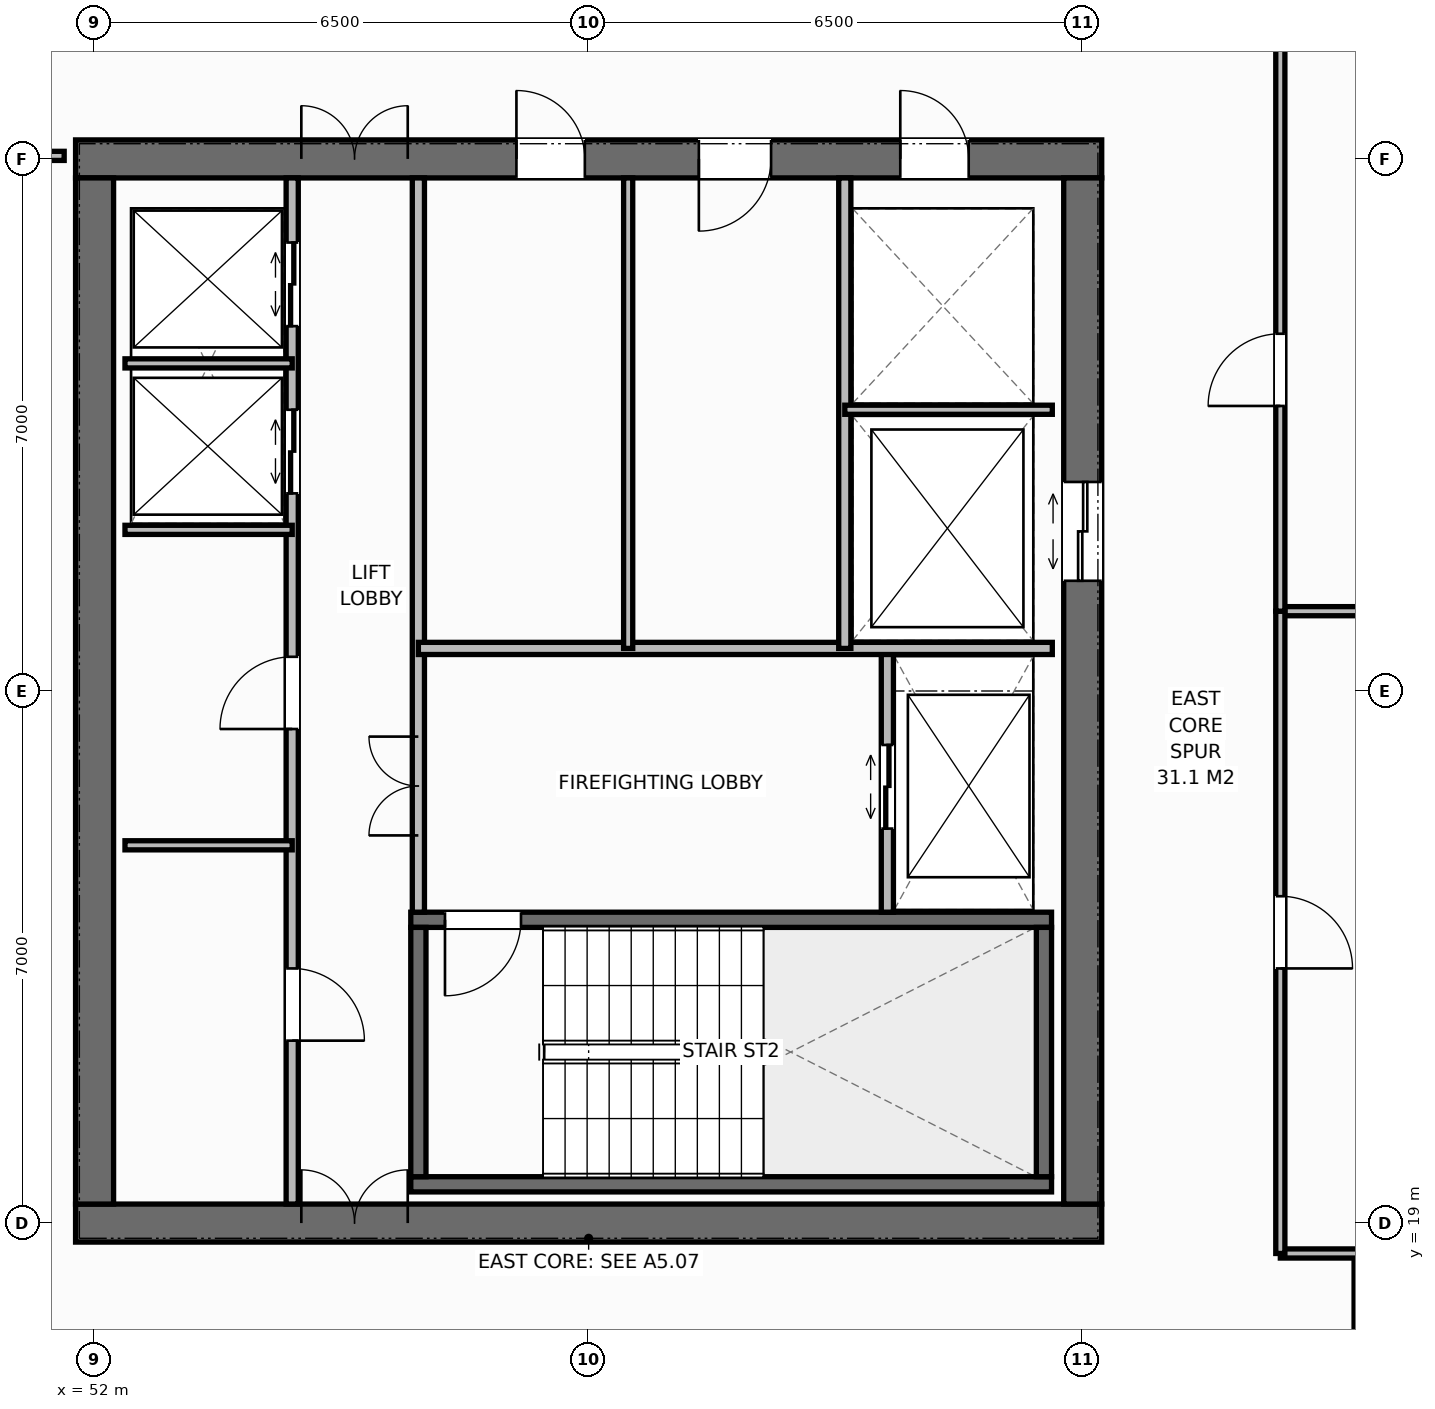
"""IFC4 building model, lengths in metres.
Left out: names, types, materials, properties, quantities, classifications, styles, units other than length and angle.
Written with IfcOpenShell. Run it as: python <this file> out.ifc"""

import sys

from ifc_helpers import new_model, si_unit, direction, frame, frame_2d, origin, place, context, subcontext, project, spatial, rectangle, extrude, element, fill, save


model = new_model("IFC4")
c1 = context("Model", 3, precision=1e-05, world=origin(), true_north=direction((0.0, 1.0)))
c2 = subcontext(c1, "Body", "Model", "MODEL_VIEW")
j1 = project(units=[si_unit("LENGTHUNIT", "METRE"), si_unit("PLANEANGLEUNIT", "RADIAN")], contexts=[c1])
p1 = place(None, origin())
s1 = spatial("IfcSite", under=j1, at=p1, CompositionType="ELEMENT")
p2 = place(p1, origin())
s2 = spatial("IfcBuilding", under=s1, at=p2, CompositionType="ELEMENT")
p3 = place(p2, frame((0.0, 0.0, 240.4)))
s3 = spatial("IfcBuildingStorey", under=s2, at=p3, CompositionType="ELEMENT", Elevation=240.4)
p4 = place(p3, frame((51.75, 19.0, 0.0), z_axis=(0.0, 0.0, 1.0), x_axis=(1.0, 0.0, 0.0)))
e1 = element("IfcWall", 1, at=p4, inside=s3, PredefinedType="SHEAR", context=c2, shape_type="SweptSolid", body=[
    extrude(rectangle(XDim=13.5, YDim=0.5, at=frame_2d((6.75, 0.0))), origin(), (0.0, 0.0, 1.0), 3.8),
])
p5 = place(p4, frame((2.97, 0.0, 0.0)))
e2 = element("IfcOpeningElement", 2, at=p5, cuts=e1, PredefinedType="OPENING", context=c2, shape_type="SweptSolid", body=[
    extrude(rectangle(XDim=1.4, YDim=2.2, at=frame_2d((0.7, 1.1))), frame((0.0, 0.26, 0.0), z_axis=(0.0, -1.0, 0.0), x_axis=(1.0, 0.0, 0.0)), (0.0, 0.0, 1.0), 0.52),
])
p6 = place(p3, frame((51.75, 33.0, 0.0), z_axis=(0.0, 0.0, 1.0), x_axis=(1.0, 0.0, 0.0)))
e3 = element("IfcWall", 3, at=p6, inside=s3, PredefinedType="SHEAR", context=c2, shape_type="SweptSolid", body=[
    extrude(rectangle(XDim=13.5, YDim=0.5, at=frame_2d((6.75, 0.0))), origin(), (0.0, 0.0, 1.0), 3.8),
])
p7 = place(p6, frame((2.97, 0.0, 0.0)))
e4 = element("IfcOpeningElement", 4, at=p7, cuts=e3, PredefinedType="OPENING", context=c2, shape_type="SweptSolid", body=[
    extrude(rectangle(XDim=1.4, YDim=2.2, at=frame_2d((0.7, 1.1))), frame((0.0, 0.26, 0.0), z_axis=(0.0, -1.0, 0.0), x_axis=(1.0, 0.0, 0.0)), (0.0, 0.0, 1.0), 0.52),
])
p8 = place(p6, frame((10.85, 0.0, 0.0)))
e5 = element("IfcOpeningElement", 5, at=p8, cuts=e3, PredefinedType="OPENING", context=c2, shape_type="SweptSolid", body=[
    extrude(rectangle(XDim=0.9, YDim=2.15, at=frame_2d((0.45, 1.075))), frame((0.0, 0.26, 0.0), z_axis=(0.0, -1.0, 0.0), x_axis=(1.0, 0.0, 0.0)), (0.0, 0.0, 1.0), 0.52),
])
p9 = place(p6, frame((5.8, 0.0, 0.0)))
e6 = element("IfcOpeningElement", 6, at=p9, cuts=e3, PredefinedType="OPENING", context=c2, shape_type="SweptSolid", body=[
    extrude(rectangle(XDim=0.9, YDim=2.15, at=frame_2d((0.45, 1.075))), frame((0.0, 0.26, 0.0), z_axis=(0.0, -1.0, 0.0), x_axis=(1.0, 0.0, 0.0)), (0.0, 0.0, 1.0), 0.52),
])
p10 = place(p6, frame((8.2, 0.0, 0.0)))
e7 = element("IfcOpeningElement", 7, at=p10, cuts=e3, PredefinedType="OPENING", context=c2, shape_type="SweptSolid", body=[
    extrude(rectangle(XDim=0.95, YDim=2.15, at=frame_2d((0.475, 1.075))), frame((0.0, 0.26, 0.0), z_axis=(0.0, -1.0, 0.0), x_axis=(1.0, 0.0, 0.0)), (0.0, 0.0, 1.0), 0.52),
])
p11 = place(p3, frame((52.0, 19.25, 0.0), z_axis=(0.0, 0.0, 1.0), x_axis=(0.0, 1.0, 0.0)))
e8 = element("IfcWall", 8, at=p11, inside=s3, PredefinedType="SHEAR", context=c2, shape_type="SweptSolid", body=[
    extrude(rectangle(XDim=13.5, YDim=0.5, at=frame_2d((6.75, 0.0))), origin(), (0.0, 0.0, 1.0), 3.8),
])
p12 = place(p3, frame((65.0, 19.25, 0.0), z_axis=(0.0, 0.0, 1.0), x_axis=(0.0, 1.0, 0.0)))
e9 = element("IfcWall", 9, at=p12, inside=s3, PredefinedType="SHEAR", context=c2, shape_type="SweptSolid", body=[
    extrude(rectangle(XDim=13.5, YDim=0.5, at=frame_2d((6.75, 0.0))), origin(), (0.0, 0.0, 1.0), 3.8),
])
p13 = place(p12, frame((8.2, 0.0, 0.0)))
e10 = element("IfcOpeningElement", 10, at=p13, cuts=e9, PredefinedType="OPENING", context=c2, shape_type="SweptSolid", body=[
    extrude(rectangle(XDim=1.3, YDim=2.2, at=frame_2d((0.65, 1.1))), frame((0.0, 0.26, 0.0), z_axis=(0.0, -1.0, 0.0), x_axis=(1.0, 0.0, 0.0)), (0.0, 0.0, 1.0), 0.52),
])
p14 = place(p3, frame((56.16, 19.51, 0.0), z_axis=(0.0, 0.0, 1.0), x_axis=(1.0, 0.0, 0.0)))
e11 = element("IfcWall", 11, at=p14, inside=s3, PredefinedType="SHEAR", context=c2, shape_type="SweptSolid", body=[
    extrude(rectangle(XDim=8.43, YDim=0.2, at=frame_2d((4.215, 0.0))), origin(), (0.0, 0.0, 1.0), 3.8),
])
p15 = place(p3, frame((56.16, 22.99, 0.0), z_axis=(0.0, 0.0, 1.0), x_axis=(1.0, 0.0, 0.0)))
e12 = element("IfcWall", 12, at=p15, inside=s3, PredefinedType="SHEAR", context=c2, shape_type="SweptSolid", body=[
    extrude(rectangle(XDim=8.43, YDim=0.2, at=frame_2d((4.215, 0.0))), origin(), (0.0, 0.0, 1.0), 3.8),
])
p16 = place(p15, frame((0.45, 0.0, 0.0)))
e13 = element("IfcOpeningElement", 13, at=p16, cuts=e12, PredefinedType="OPENING", context=c2, shape_type="SweptSolid", body=[
    extrude(rectangle(XDim=1.0, YDim=2.15, at=frame_2d((0.5, 1.075))), frame((0.0, 0.11, 0.0), z_axis=(0.0, -1.0, 0.0), x_axis=(1.0, 0.0, 0.0)), (0.0, 0.0, 1.0), 0.22),
])
for number, where, z_axis, x_axis in (
    (14, (56.26, 19.61, 0.0), (0.0, 0.0, 1.0), (0.0, 1.0, 0.0)),
    (15, (64.49, 19.61, 0.0), (0.0, 0.0, 1.0), (0.0, 1.0, 0.0)),
):
    element("IfcWall", number, at=place(p3, frame(where, z_axis=z_axis, x_axis=x_axis)), inside=s3, PredefinedType="SHEAR", context=c2, shape_type="SweptSolid", body=[
        extrude(rectangle(XDim=3.28, YDim=0.2, at=frame_2d((1.64, 0.0))), origin(), (0.0, 0.0, 1.0), 3.8),
    ])
p17 = place(p3, frame((54.6, 19.25, 0.0), z_axis=(0.0, 0.0, 1.0), x_axis=(0.0, 1.0, 0.0)))
e16 = element("IfcWall", 16, at=p17, inside=s3, PredefinedType="STANDARD", context=c2, shape_type="SweptSolid", body=[
    extrude(rectangle(XDim=13.5, YDim=0.16, at=frame_2d((6.75, 0.0))), origin(), (0.0, 0.0, 1.0), 3.58),
])
p18 = place(p17, frame((2.15, 0.0, 0.0)))
e17 = element("IfcOpeningElement", 17, at=p18, cuts=e16, PredefinedType="OPENING", context=c2, shape_type="SweptSolid", body=[
    extrude(rectangle(XDim=0.95, YDim=2.15, at=frame_2d((0.475, 1.075))), frame((0.0, 0.09, 0.0), z_axis=(0.0, -1.0, 0.0), x_axis=(1.0, 0.0, 0.0)), (0.0, 0.0, 1.0), 0.18),
])
p19 = place(p17, frame((6.25, 0.0, 0.0)))
e18 = element("IfcOpeningElement", 18, at=p19, cuts=e16, PredefinedType="OPENING", context=c2, shape_type="SweptSolid", body=[
    extrude(rectangle(XDim=0.95, YDim=2.15, at=frame_2d((0.475, 1.075))), frame((0.0, 0.09, 0.0), z_axis=(0.0, -1.0, 0.0), x_axis=(1.0, 0.0, 0.0)), (0.0, 0.0, 1.0), 0.18),
])
p20 = place(p17, frame((9.35, 0.0, 0.0)))
e19 = element("IfcOpeningElement", 19, at=p20, cuts=e16, PredefinedType="OPENING", context=c2, shape_type="SweptSolid", body=[
    extrude(rectangle(XDim=1.1, YDim=2.2, at=frame_2d((0.55, 1.1))), frame((0.0, 0.09, 0.0), z_axis=(0.0, -1.0, 0.0), x_axis=(1.0, 0.0, 0.0)), (0.0, 0.0, 1.0), 0.18),
])
p21 = place(p17, frame((11.55, 0.0, 0.0)))
e20 = element("IfcOpeningElement", 20, at=p21, cuts=e16, PredefinedType="OPENING", context=c2, shape_type="SweptSolid", body=[
    extrude(rectangle(XDim=1.1, YDim=2.2, at=frame_2d((0.55, 1.1))), frame((0.0, 0.09, 0.0), z_axis=(0.0, -1.0, 0.0), x_axis=(1.0, 0.0, 0.0)), (0.0, 0.0, 1.0), 0.18),
])
p22 = place(p3, frame((56.26, 23.09, 0.0), z_axis=(0.0, 0.0, 1.0), x_axis=(0.0, 1.0, 0.0)))
e21 = element("IfcWall", 21, at=p22, inside=s3, PredefinedType="STANDARD", context=c2, shape_type="SweptSolid", body=[
    extrude(rectangle(XDim=9.66, YDim=0.16, at=frame_2d((4.83, 0.0))), origin(), (0.0, 0.0, 1.0), 3.58),
])
p23 = place(p22, frame((1.01, 0.0, 0.0)))
e22 = element("IfcOpeningElement", 22, at=p23, cuts=e21, PredefinedType="OPENING", context=c2, shape_type="SweptSolid", body=[
    extrude(rectangle(XDim=1.3, YDim=2.2, at=frame_2d((0.65, 1.1))), frame((0.0, 0.09, 0.0), z_axis=(0.0, -1.0, 0.0), x_axis=(1.0, 0.0, 0.0)), (0.0, 0.0, 1.0), 0.18),
])
for number, where, z_axis, x_axis in (
    (23, (52.4, 23.97, 0.0), (0.0, 0.0, 1.0), (1.0, 0.0, 0.0)),
    (24, (52.4, 28.12, 0.0), (0.0, 0.0, 1.0), (1.0, 0.0, 0.0)),
    (25, (52.4, 30.31, 0.0), (0.0, 0.0, 1.0), (1.0, 0.0, 0.0)),
):
    element("IfcWall", number, at=place(p3, frame(where, z_axis=z_axis, x_axis=x_axis)), inside=s3, PredefinedType="PARTITIONING", context=c2, shape_type="SweptSolid", body=[
        extrude(rectangle(XDim=2.2, YDim=0.12, at=frame_2d((1.1, 0.0))), origin(), (0.0, 0.0, 1.0), 3.58),
    ])
p24 = place(p3, frame((62.43, 23.09, 0.0), z_axis=(0.0, 0.0, 1.0), x_axis=(0.0, 1.0, 0.0)))
e26 = element("IfcWall", 26, at=p24, inside=s3, PredefinedType="STANDARD", context=c2, shape_type="SweptSolid", body=[
    extrude(rectangle(XDim=3.47, YDim=0.16, at=frame_2d((1.735, 0.0))), origin(), (0.0, 0.0, 1.0), 3.58),
])
p25 = place(p24, frame((1.1, 0.0, 0.0)))
e27 = element("IfcOpeningElement", 27, at=p25, cuts=e26, PredefinedType="OPENING", context=c2, shape_type="SweptSolid", body=[
    extrude(rectangle(XDim=1.1, YDim=2.2, at=frame_2d((0.55, 1.1))), frame((0.0, 0.09, 0.0), z_axis=(0.0, -1.0, 0.0), x_axis=(1.0, 0.0, 0.0)), (0.0, 0.0, 1.0), 0.18),
])
p26 = place(p3, frame((56.26, 26.56, 0.0), z_axis=(0.0, 0.0, 1.0), x_axis=(1.0, 0.0, 0.0)))
e28 = element("IfcWall", 28, at=p26, inside=s3, PredefinedType="STANDARD", context=c2, shape_type="SweptSolid", body=[
    extrude(rectangle(XDim=8.34, YDim=0.16, at=frame_2d((4.17, 0.0))), origin(), (0.0, 0.0, 1.0), 3.58),
])
p27 = place(p3, frame((61.87, 26.56, 0.0), z_axis=(0.0, 0.0, 1.0), x_axis=(0.0, 1.0, 0.0)))
e29 = element("IfcWall", 29, at=p27, inside=s3, PredefinedType="STANDARD", context=c2, shape_type="SweptSolid", body=[
    extrude(rectangle(XDim=6.19, YDim=0.16, at=frame_2d((3.095, 0.0))), origin(), (0.0, 0.0, 1.0), 3.58),
])
p28 = place(p3, frame((61.87, 29.7, 0.0), z_axis=(0.0, 0.0, 1.0), x_axis=(1.0, 0.0, 0.0)))
e30 = element("IfcWall", 30, at=p28, inside=s3, PredefinedType="PARTITIONING", context=c2, shape_type="SweptSolid", body=[
    extrude(rectangle(XDim=2.73, YDim=0.12, at=frame_2d((1.365, 0.0))), origin(), (0.0, 0.0, 1.0), 3.58),
])
p29 = place(p3, frame((59.02, 26.56, 0.0), z_axis=(0.0, 0.0, 1.0), x_axis=(0.0, 1.0, 0.0)))
e31 = element("IfcWall", 31, at=p29, inside=s3, PredefinedType="PARTITIONING", context=c2, shape_type="SweptSolid", body=[
    extrude(rectangle(XDim=6.19, YDim=0.12, at=frame_2d((3.095, 0.0))), origin(), (0.0, 0.0, 1.0), 3.58),
])
p30 = place(p3, frame((48.0, 33.04, 0.0), z_axis=(0.0, 0.0, 1.0), x_axis=(1.0, 0.0, 0.0)))
e32 = element("IfcWall", 32, at=p30, inside=s3, PredefinedType="PARTITIONING", context=c2, shape_type="SweptSolid", body=[
    extrude(rectangle(XDim=3.6, YDim=0.12, at=frame_2d((1.8, 0.0))), origin(), (0.0, 0.0, 1.0), 3.32),
])
p31 = place(p30, frame((1.1, 0.0, 0.0)))
e33 = element("IfcOpeningElement", 33, at=p31, cuts=e32, PredefinedType="OPENING", context=c2, shape_type="SweptSolid", body=[
    extrude(rectangle(XDim=0.95, YDim=2.15, at=frame_2d((0.475, 1.075))), frame((0.0, 0.07, 0.0), z_axis=(0.0, -1.0, 0.0), x_axis=(1.0, 0.0, 0.0)), (0.0, 0.0, 1.0), 0.14),
])
p32 = place(p3, frame((68.63, 16.5, 0.0), z_axis=(0.0, 0.0, 1.0), x_axis=(0.0, 1.0, 0.0)))
e34 = element("IfcWall", 34, at=p32, inside=s3, PredefinedType="PARTITIONING", context=c2, shape_type="SweptSolid", body=[
    extrude(rectangle(XDim=2.1, YDim=0.12, at=frame_2d((1.05, 0.0))), origin(), (0.0, 0.0, 1.0), 3.58),
])
for number, where, z_axis, x_axis in (
    (35, (67.6, 18.6, 0.0), (0.0, 0.0, 1.0), (1.0, 0.0, 0.0)),
    (36, (67.6, 27.05, 0.0), (0.0, 0.0, 1.0), (1.0, 0.0, 0.0)),
):
    element("IfcWall", number, at=place(p3, frame(where, z_axis=z_axis, x_axis=x_axis)), inside=s3, PredefinedType="PARTITIONING", context=c2, shape_type="SweptSolid", body=[
        extrude(rectangle(XDim=4.58, YDim=0.12, at=frame_2d((2.29, 0.0))), origin(), (0.0, 0.0, 1.0), 3.58),
    ])
p33 = place(p3, frame((67.6, 18.6, 0.0), z_axis=(0.0, 0.0, 1.0), x_axis=(0.0, 1.0, 0.0)))
e37 = element("IfcWall", 37, at=p33, inside=s3, PredefinedType="PARTITIONING", context=c2, shape_type="SweptSolid", body=[
    extrude(rectangle(XDim=8.45, YDim=0.12, at=frame_2d((4.225, 0.0))), origin(), (0.0, 0.0, 1.0), 3.58),
])
p34 = place(p33, frame((3.75, 0.0, 0.0)))
e38 = element("IfcOpeningElement", 38, at=p34, cuts=e37, PredefinedType="OPENING", context=c2, shape_type="SweptSolid", body=[
    extrude(rectangle(XDim=0.95, YDim=2.15, at=frame_2d((0.475, 1.075))), frame((0.0, 0.07, 0.0), z_axis=(0.0, -1.0, 0.0), x_axis=(1.0, 0.0, 0.0)), (0.0, 0.0, 1.0), 0.14),
])
p35 = place(p3, frame((67.6, 27.05, 0.0), z_axis=(0.0, 0.0, 1.0), x_axis=(0.0, 1.0, 0.0)))
e39 = element("IfcWall", 39, at=p35, inside=s3, PredefinedType="PARTITIONING", context=c2, shape_type="SweptSolid", body=[
    extrude(rectangle(XDim=8.45, YDim=0.12, at=frame_2d((4.225, 0.0))), origin(), (0.0, 0.0, 1.0), 3.58),
])
p36 = place(p35, frame((2.7, 0.0, 0.0)))
e40 = element("IfcOpeningElement", 40, at=p36, cuts=e39, PredefinedType="OPENING", context=c2, shape_type="SweptSolid", body=[
    extrude(rectangle(XDim=0.95, YDim=2.15, at=frame_2d((0.475, 1.075))), frame((0.0, 0.07, 0.0), z_axis=(0.0, -1.0, 0.0), x_axis=(1.0, 0.0, 0.0)), (0.0, 0.0, 1.0), 0.14),
])
p37 = place(p5, origin())
e41 = element("IfcDoor", 41, at=p37, inside=s3, OperationType="DOUBLE_DOOR_SINGLE_SWING", PredefinedType="DOOR", context=c2, shape_type="SweptSolid", body=[
    extrude(rectangle(XDim=1.4, YDim=2.2, at=frame_2d((0.7, 1.1))), frame((0.0, 0.075, 0.0), z_axis=(0.0, -1.0, 0.0), x_axis=(1.0, 0.0, 0.0)), (0.0, 0.0, 1.0), 0.05),
])
fill(e2, e41)
p38 = place(p7, origin())
e42 = element("IfcDoor", 42, at=p38, inside=s3, OperationType="DOUBLE_DOOR_SINGLE_SWING", PredefinedType="DOOR", context=c2, shape_type="SweptSolid", body=[
    extrude(rectangle(XDim=1.4, YDim=2.2, at=frame_2d((0.7, 1.1))), frame((0.0, -0.025, 0.0), z_axis=(0.0, -1.0, 0.0), x_axis=(1.0, 0.0, 0.0)), (0.0, 0.0, 1.0), 0.05),
])
fill(e4, e42)
p39 = place(p18, origin())
e43 = element("IfcDoor", 43, at=p39, inside=s3, OperationType="SINGLE_SWING_RIGHT", PredefinedType="DOOR", context=c2, shape_type="SweptSolid", body=[
    extrude(rectangle(XDim=0.95, YDim=2.15, at=frame_2d((0.475, 1.075))), frame((0.0, 0.025, 0.0), z_axis=(0.0, -1.0, 0.0), x_axis=(1.0, 0.0, 0.0)), (0.0, 0.0, 1.0), 0.05),
])
fill(e17, e43)
p40 = place(p19, origin())
e44 = element("IfcDoor", 44, at=p40, inside=s3, OperationType="SINGLE_SWING_LEFT", PredefinedType="DOOR", context=c2, shape_type="SweptSolid", body=[
    extrude(rectangle(XDim=0.95, YDim=2.15, at=frame_2d((0.475, 1.075))), frame((0.0, 0.025, 0.0), z_axis=(0.0, -1.0, 0.0), x_axis=(1.0, 0.0, 0.0)), (0.0, 0.0, 1.0), 0.05),
])
fill(e18, e44)
p41 = place(p20, origin())
e45 = element("IfcDoor", 45, at=p41, inside=s3, OperationType="DOUBLE_DOOR_SLIDING", PredefinedType="DOOR", context=c2, shape_type="SweptSolid", body=[
    extrude(rectangle(XDim=1.1, YDim=2.2, at=frame_2d((0.55, 1.1))), frame((0.0, 0.025, 0.0), z_axis=(0.0, -1.0, 0.0), x_axis=(1.0, 0.0, 0.0)), (0.0, 0.0, 1.0), 0.05),
])
fill(e19, e45)
p42 = place(p21, origin())
e46 = element("IfcDoor", 46, at=p42, inside=s3, OperationType="DOUBLE_DOOR_SLIDING", PredefinedType="DOOR", context=c2, shape_type="SweptSolid", body=[
    extrude(rectangle(XDim=1.1, YDim=2.2, at=frame_2d((0.55, 1.1))), frame((0.0, 0.025, 0.0), z_axis=(0.0, -1.0, 0.0), x_axis=(1.0, 0.0, 0.0)), (0.0, 0.0, 1.0), 0.05),
])
fill(e20, e46)
p43 = place(p16, origin())
e47 = element("IfcDoor", 47, at=p43, inside=s3, OperationType="SINGLE_SWING_RIGHT", PredefinedType="DOOR", context=c2, shape_type="SweptSolid", body=[
    extrude(rectangle(XDim=1.0, YDim=2.15, at=frame_2d((0.5, 1.075))), frame((0.0, 0.025, 0.0), z_axis=(0.0, -1.0, 0.0), x_axis=(1.0, 0.0, 0.0)), (0.0, 0.0, 1.0), 0.05),
])
fill(e13, e47)
p44 = place(p25, origin())
e48 = element("IfcDoor", 48, at=p44, inside=s3, OperationType="DOUBLE_DOOR_SLIDING", PredefinedType="DOOR", context=c2, shape_type="SweptSolid", body=[
    extrude(rectangle(XDim=1.1, YDim=2.2, at=frame_2d((0.55, 1.1))), frame((0.0, 0.025, 0.0), z_axis=(0.0, -1.0, 0.0), x_axis=(1.0, 0.0, 0.0)), (0.0, 0.0, 1.0), 0.05),
])
fill(e27, e48)
p45 = place(p23, origin())
e49 = element("IfcDoor", 49, at=p45, inside=s3, OperationType="DOUBLE_DOOR_SINGLE_SWING", PredefinedType="DOOR", context=c2, shape_type="SweptSolid", body=[
    extrude(rectangle(XDim=1.3, YDim=2.2, at=frame_2d((0.65, 1.1))), frame((0.0, 0.025, 0.0), z_axis=(0.0, -1.0, 0.0), x_axis=(1.0, 0.0, 0.0)), (0.0, 0.0, 1.0), 0.05),
])
fill(e22, e49)
p46 = place(p13, origin())
e50 = element("IfcDoor", 50, at=p46, inside=s3, OperationType="DOUBLE_DOOR_SLIDING", PredefinedType="DOOR", context=c2, shape_type="SweptSolid", body=[
    extrude(rectangle(XDim=1.3, YDim=2.2, at=frame_2d((0.65, 1.1))), frame((0.0, 0.025, 0.0), z_axis=(0.0, -1.0, 0.0), x_axis=(1.0, 0.0, 0.0)), (0.0, 0.0, 1.0), 0.05),
])
fill(e10, e50)
p47 = place(p8, origin())
e51 = element("IfcDoor", 51, at=p47, inside=s3, OperationType="SINGLE_SWING_LEFT", PredefinedType="DOOR", context=c2, shape_type="SweptSolid", body=[
    extrude(rectangle(XDim=0.9, YDim=2.15, at=frame_2d((0.45, 1.075))), frame((0.0, -0.025, 0.0), z_axis=(0.0, -1.0, 0.0), x_axis=(1.0, 0.0, 0.0)), (0.0, 0.0, 1.0), 0.05),
])
fill(e5, e51)
p48 = place(p9, origin())
e52 = element("IfcDoor", 52, at=p48, inside=s3, OperationType="SINGLE_SWING_LEFT", PredefinedType="DOOR", context=c2, shape_type="SweptSolid", body=[
    extrude(rectangle(XDim=0.9, YDim=2.15, at=frame_2d((0.45, 1.075))), frame((0.0, -0.025, 0.0), z_axis=(0.0, -1.0, 0.0), x_axis=(1.0, 0.0, 0.0)), (0.0, 0.0, 1.0), 0.05),
])
fill(e6, e52)
p49 = place(p10, origin())
e53 = element("IfcDoor", 53, at=p49, inside=s3, OperationType="SINGLE_SWING_RIGHT", PredefinedType="DOOR", context=c2, shape_type="SweptSolid", body=[
    extrude(rectangle(XDim=0.95, YDim=2.15, at=frame_2d((0.475, 1.075))), frame((0.0, -0.025, 0.0), z_axis=(0.0, -1.0, 0.0), x_axis=(1.0, 0.0, 0.0)), (0.0, 0.0, 1.0), 0.05),
])
fill(e7, e53)
p50 = place(p34, origin())
e54 = element("IfcDoor", 54, at=p50, inside=s3, OperationType="SINGLE_SWING_RIGHT", PredefinedType="DOOR", context=c2, shape_type="SweptSolid", body=[
    extrude(rectangle(XDim=0.95, YDim=2.15, at=frame_2d((0.475, 1.075))), frame((0.0, 0.025, 0.0), z_axis=(0.0, -1.0, 0.0), x_axis=(1.0, 0.0, 0.0)), (0.0, 0.0, 1.0), 0.05),
])
fill(e38, e54)
p51 = place(p36, origin())
e55 = element("IfcDoor", 55, at=p51, inside=s3, OperationType="SINGLE_SWING_LEFT", PredefinedType="DOOR", context=c2, shape_type="SweptSolid", body=[
    extrude(rectangle(XDim=0.95, YDim=2.15, at=frame_2d((0.475, 1.075))), frame((0.0, 0.025, 0.0), z_axis=(0.0, -1.0, 0.0), x_axis=(1.0, 0.0, 0.0)), (0.0, 0.0, 1.0), 0.05),
])
fill(e40, e55)
save(model, sys.argv[1])
